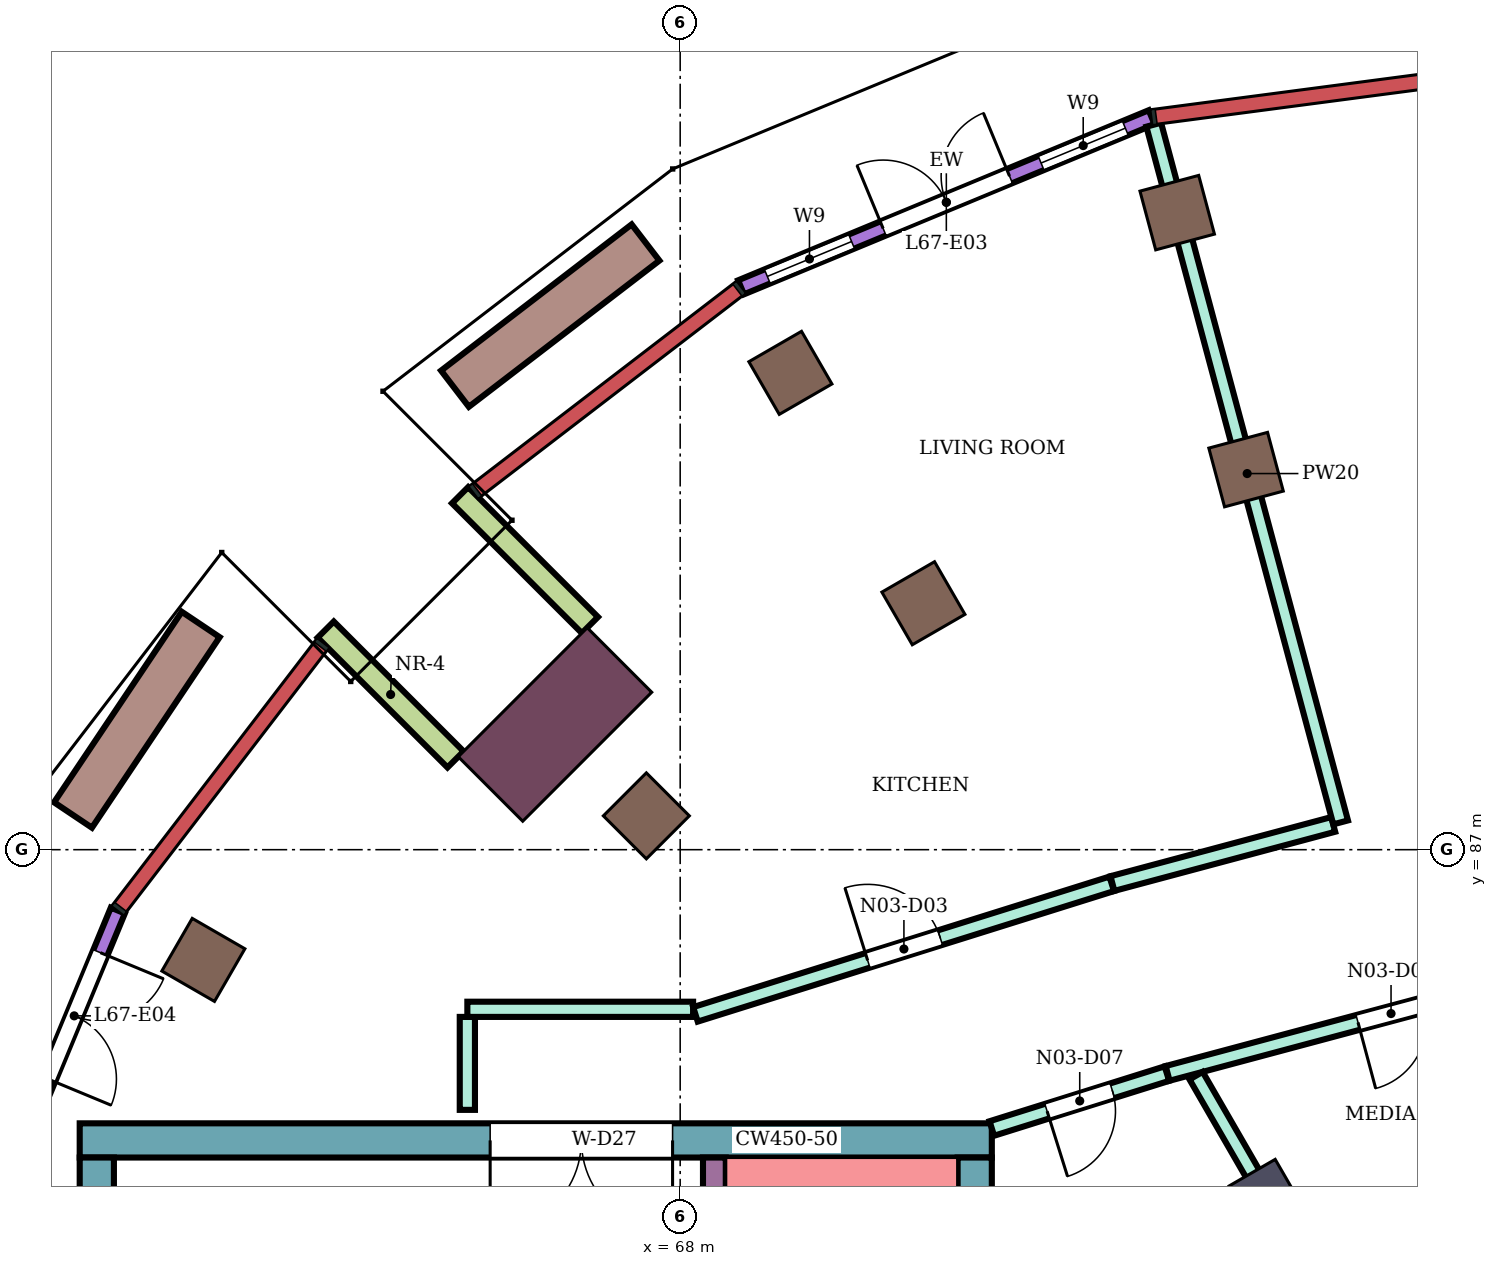
"""IFC4 building model, lengths in metres.
Left out: names, types, materials, properties, quantities, classifications, styles, units other than length and angle.
Written with IfcOpenShell. Run it as: python <this file> out.ifc"""

import sys

from ifc_helpers import new_model, si_unit, direction, frame, frame_2d, origin, origin_2d, place, context, subcontext, project, spatial, rectangle, extrude, element, fill, save


model = new_model("IFC4")
c1 = context("Model", 3, precision=1e-05, world=origin(), true_north=direction((0.0, 1.0)))
c2 = subcontext(c1, "Body", "Model", "MODEL_VIEW")
j1 = project(units=[si_unit("LENGTHUNIT", "METRE"), si_unit("PLANEANGLEUNIT", "RADIAN")], contexts=[c1])
p1 = place(None, origin())
s1 = spatial("IfcSite", under=j1, at=p1, CompositionType="ELEMENT")
p2 = place(p1, origin())
s2 = spatial("IfcBuilding", under=s1, at=p2, CompositionType="ELEMENT")
p3 = place(p2, frame((0.0, 0.0, 292.5)))
s3 = spatial("IfcBuildingStorey", under=s2, at=p3, CompositionType="ELEMENT", Elevation=292.5)
for number, where, z_axis, x_axis in (
    (1, (74.539, 95.381, 0.0), (0.0, 0.0, 1.0), (-0.259, 0.966, 0.0)),
    (2, (69.45, 93.273, 0.0), (0.0, 0.0, 1.0), (-0.5, 0.866, 0.0)),
    (3, (61.727, 85.55, 0.0), (0.0, 0.0, 1.0), (-0.866, 0.5, 0.0)),
    (4, (75.445, 92.0, 0.0), (0.0, 0.0, 1.0), (-0.259, 0.966, 0.0)),
    (5, (71.2, 90.242, 0.0), (0.0, 0.0, 1.0), (-0.5, 0.866, 0.0)),
    (6, (67.555, 87.445, 0.0), (0.0, 0.0, 1.0), (-0.707, 0.707, 0.0)),
):
    element("IfcColumn", number, at=place(p3, frame(where, z_axis=z_axis, x_axis=x_axis)), inside=s3, PredefinedType="COLUMN", context=c2, shape_type="SweptSolid", body=[
        extrude(rectangle(XDim=0.8, YDim=0.8, at=origin_2d()), origin(), (0.0, 0.0, 1.0), 4.2),
    ])
p4 = place(p3, frame((75.7, 82.448, 0.0), z_axis=(0.0, 0.0, 1.0), x_axis=(-0.5, 0.866025403784, 0.0)))
e7 = element("IfcColumn", 7, at=p4, inside=s3, PredefinedType="COLUMN", context=c2, shape_type="SweptSolid", body=[
    extrude(rectangle(XDim=0.7, YDim=0.7, at=origin_2d()), origin(), (0.0, 0.0, 1.0), 4.2),
])
p5 = place(p3, frame((66.353, 88.647, 0.0), z_axis=(0.0, 0.0, 1.0), x_axis=(-0.707106781187, 0.707106781187, 0.0)))
e8 = element("IfcColumn", 8, at=p5, inside=s3, PredefinedType="COLUMN", context=c2, shape_type="SweptSolid", body=[
    extrude(rectangle(XDim=1.2, YDim=2.4, at=origin_2d()), origin(), (0.0, 0.0, 1.0), 4.2),
])
p6 = place(p3, frame((72.1, 83.175, 0.0), z_axis=(0.0, 0.0, 1.0), x_axis=(-1.0, 0.0, 0.0)))
e9 = element("IfcWall", 9, at=p6, inside=s3, PredefinedType="SHEAR", context=c2, shape_type="SweptSolid", body=[
    extrude(rectangle(XDim=12.0, YDim=0.45, at=frame_2d((6.0, 0.0))), origin(), (0.0, 0.0, 1.0), 3.88),
])
p7 = place(p6, frame((4.2, 0.0, 0.0)))
e10 = element("IfcOpeningElement", 10, at=p7, cuts=e9, PredefinedType="OPENING", context=c2, shape_type="SweptSolid", body=[
    extrude(rectangle(XDim=2.4, YDim=2.4, at=frame_2d((1.2, 1.2))), frame((0.0, 0.235, 0.0), z_axis=(0.0, -1.0, 0.0), x_axis=(1.0, 0.0, 0.0)), (0.0, 0.0, 1.0), 0.47),
])
p8 = place(p3, frame((71.875, 82.95, 0.0), z_axis=(0.0, 0.0, 1.0), x_axis=(0.0, -1.0, 0.0)))
e11 = element("IfcWall", 11, at=p8, inside=s3, PredefinedType="SHEAR", context=c2, shape_type="SweptSolid", body=[
    extrude(rectangle(XDim=7.95, YDim=0.45, at=frame_2d((3.975, 0.0))), origin(), (0.0, 0.0, 1.0), 3.88),
])
p9 = place(p3, frame((60.325, 82.95, 0.0), z_axis=(0.0, 0.0, 1.0), x_axis=(0.0, -1.0, 0.0)))
e12 = element("IfcWall", 12, at=p9, inside=s3, PredefinedType="SHEAR", context=c2, shape_type="SweptSolid", body=[
    extrude(rectangle(XDim=3.7, YDim=0.45, at=frame_2d((1.85, 0.0))), origin(), (0.0, 0.0, 1.0), 3.88),
])
p10 = place(p3, frame((68.45, 82.95, 0.0), z_axis=(0.0, 0.0, 1.0), x_axis=(0.0, -1.0, 0.0)))
e13 = element("IfcWall", 13, at=p10, inside=s3, PredefinedType="SHEAR", context=c2, shape_type="SweptSolid", body=[
    extrude(rectangle(XDim=7.95, YDim=0.3, at=frame_2d((3.975, 0.0))), origin(), (0.0, 0.0, 1.0), 3.88),
])
p11 = place(p10, frame((0.6, 0.0, 0.0)))
e14 = element("IfcOpeningElement", 14, at=p11, cuts=e13, PredefinedType="OPENING", context=c2, shape_type="SweptSolid", body=[
    extrude(rectangle(XDim=0.9, YDim=2.1, at=frame_2d((0.45, 1.05))), frame((0.0, 0.16, 0.0), z_axis=(0.0, -1.0, 0.0), x_axis=(1.0, 0.0, 0.0)), (0.0, 0.0, 1.0), 0.32),
])
p12 = place(p3, frame((74.203, 96.636, 0.0), z_axis=(0.0, 0.0, 1.0), x_axis=(-0.923869250418, -0.382708254591, 0.0)))
e15 = element("IfcWall", 15, at=p12, inside=s3, PredefinedType="NOTDEFINED", context=c2, shape_type="SweptSolid", body=[
    extrude(rectangle(XDim=5.847, YDim=0.2, at=frame_2d((2.924, 0.0))), origin(), (0.0, 0.0, 1.0), 4.2),
])
p13 = place(p12, frame((0.375, 0.0, 0.9)))
e16 = element("IfcOpeningElement", 16, at=p13, cuts=e15, PredefinedType="OPENING", context=c2, shape_type="SweptSolid", body=[
    extrude(rectangle(XDim=1.2, YDim=2.7, at=frame_2d((0.6, 1.35))), frame((0.0, 0.11, 0.0), z_axis=(0.0, -1.0, 0.0), x_axis=(1.0, 0.0, 0.0)), (0.0, 0.0, 1.0), 0.22),
])
p14 = place(p12, frame((2.024, 0.0, 0.0)))
e17 = element("IfcOpeningElement", 17, at=p14, cuts=e15, PredefinedType="OPENING", context=c2, shape_type="SweptSolid", body=[
    extrude(rectangle(XDim=1.8, YDim=2.7, at=frame_2d((0.9, 1.35))), frame((0.0, 0.11, 0.0), z_axis=(0.0, -1.0, 0.0), x_axis=(1.0, 0.0, 0.0)), (0.0, 0.0, 1.0), 0.22),
])
p15 = place(p12, frame((4.273, 0.0, 0.9)))
e18 = element("IfcOpeningElement", 18, at=p15, cuts=e15, PredefinedType="OPENING", context=c2, shape_type="SweptSolid", body=[
    extrude(rectangle(XDim=1.2, YDim=2.7, at=frame_2d((0.6, 1.35))), frame((0.0, 0.11, 0.0), z_axis=(0.0, -1.0, 0.0), x_axis=(1.0, 0.0, 0.0)), (0.0, 0.0, 1.0), 0.22),
])
p16 = place(p3, frame((60.602, 86.199, 0.0), z_axis=(0.0, 0.0, 1.0), x_axis=(-0.382708254591, -0.923869250418, 0.0)))
e19 = element("IfcWall", 19, at=p16, inside=s3, PredefinedType="NOTDEFINED", context=c2, shape_type="SweptSolid", body=[
    extrude(rectangle(XDim=5.847, YDim=0.2, at=frame_2d((2.924, 0.0))), origin(), (0.0, 0.0, 1.0), 4.2),
])
p17 = place(p16, frame((0.6, 0.0, 0.0)))
e20 = element("IfcOpeningElement", 20, at=p17, cuts=e19, PredefinedType="OPENING", context=c2, shape_type="SweptSolid", body=[
    extrude(rectangle(XDim=1.8, YDim=2.7, at=frame_2d((0.9, 1.35))), frame((0.0, 0.11, 0.0), z_axis=(0.0, -1.0, 0.0), x_axis=(1.0, 0.0, 0.0)), (0.0, 0.0, 1.0), 0.22),
])
p18 = place(p16, frame((2.85, 0.0, 0.9)))
e21 = element("IfcOpeningElement", 21, at=p18, cuts=e19, PredefinedType="OPENING", context=c2, shape_type="SweptSolid", body=[
    extrude(rectangle(XDim=1.2, YDim=2.7, at=frame_2d((0.6, 1.35))), frame((0.0, 0.11, 0.0), z_axis=(0.0, -1.0, 0.0), x_axis=(1.0, 0.0, 0.0)), (0.0, 0.0, 1.0), 0.22),
])
for number, where, z_axis, x_axis in (
    (22, (66.812, 89.955, 0.0), (0.0, 0.0, 1.0), (-0.707, 0.707, 0.0)),
    (23, (65.045, 88.188, 0.0), (0.0, 0.0, 1.0), (-0.707, 0.707, 0.0)),
):
    element("IfcWall", number, at=place(p3, frame(where, z_axis=z_axis, x_axis=x_axis)), inside=s3, PredefinedType="NOTDEFINED", context=c2, shape_type="SweptSolid", body=[
        extrude(rectangle(XDim=2.416, YDim=0.3, at=frame_2d((1.208, 0.0))), origin(), (0.0, 0.0, 1.0), 4.2),
    ])
p19 = place(p3, frame((80.0, 82.604, 0.0), z_axis=(0.0, 0.0, 1.0), x_axis=(-0.965933654434, -0.258789828301, 0.0)))
e24 = element("IfcWall", 24, at=p19, inside=s3, PredefinedType="NOTDEFINED", context=c2, shape_type="SweptSolid", body=[
    extrude(rectangle(XDim=3.936, YDim=0.2, at=frame_2d((1.968, 0.0))), origin(), (0.0, 0.0, 1.0), 4.2),
])
p20 = place(p19, frame((0.468, 0.0, 0.9)))
e25 = element("IfcOpeningElement", 25, at=p20, cuts=e24, PredefinedType="OPENING", context=c2, shape_type="SweptSolid", body=[
    extrude(rectangle(XDim=3.0, YDim=2.3, at=frame_2d((1.5, 1.15))), frame((0.0, 0.11, 0.0), z_axis=(0.0, -1.0, 0.0), x_axis=(1.0, 0.0, 0.0)), (0.0, 0.0, 1.0), 0.22),
])
p21 = place(p3, frame((67.544, 94.988, 0.0), z_axis=(0.0, 0.0, 1.0), x_axis=(-0.793350112932, -0.608765634962, 0.0)))
e26 = element("IfcWall", 26, at=p21, inside=s3, PredefinedType="USERDEFINED", context=c2, shape_type="SweptSolid", body=[
    extrude(rectangle(XDim=3.16, YDim=0.6, at=frame_2d((1.58, 0.0))), origin(), (0.0, 0.0, 1.0), 0.6),
])
p22 = place(p3, frame((61.692, 89.963, 0.0), z_axis=(0.0, 0.0, 1.0), x_axis=(-0.556696289076, -0.830716101763, 0.0)))
e27 = element("IfcWall", 27, at=p22, inside=s3, PredefinedType="USERDEFINED", context=c2, shape_type="SweptSolid", body=[
    extrude(rectangle(XDim=3.018, YDim=0.6, at=frame_2d((1.509, 0.0))), origin(), (0.0, 0.0, 1.0), 0.6),
])
p23 = place(p3, frame((65.2, 83.577, 0.0), z_axis=(0.0, 0.0, 1.0), x_axis=(0.0, 1.0, 0.0)))
e28 = element("IfcWall", 28, at=p23, inside=s3, PredefinedType="PARTITIONING", context=c2, shape_type="SweptSolid", body=[
    extrude(rectangle(XDim=1.223, YDim=0.2, at=frame_2d((0.612, 0.0))), origin(), (0.0, 0.0, 1.0), 3.75),
])
p24 = place(p3, frame((65.2, 84.9, 0.0), z_axis=(0.0, 0.0, 1.0), x_axis=(1.0, 0.0, 0.0)))
e29 = element("IfcWall", 29, at=p24, inside=s3, PredefinedType="PARTITIONING", context=c2, shape_type="SweptSolid", body=[
    extrude(rectangle(XDim=2.97, YDim=0.2, at=frame_2d((1.485, 0.0))), origin(), (0.0, 0.0, 1.0), 3.75),
])
p25 = place(p3, frame((68.201, 84.833, 0.0), z_axis=(0.0, 0.0, 1.0), x_axis=(0.95420102455, 0.299166182492, 0.0)))
e30 = element("IfcWall", 30, at=p25, inside=s3, PredefinedType="PARTITIONING", context=c2, shape_type="SweptSolid", body=[
    extrude(rectangle(XDim=5.74, YDim=0.2, at=frame_2d((2.87, 0.0))), origin(), (0.0, 0.0, 1.0), 3.75),
])
p26 = place(p25, frame((2.374, 0.0, 0.0)))
e31 = element("IfcOpeningElement", 31, at=p26, cuts=e30, PredefinedType="OPENING", context=c2, shape_type="SweptSolid", body=[
    extrude(rectangle(XDim=1.0, YDim=2.1, at=frame_2d((0.5, 1.05))), frame((0.0, 0.11, 0.0), z_axis=(0.0, -1.0, 0.0), x_axis=(1.0, 0.0, 0.0)), (0.0, 0.0, 1.0), 0.22),
])
p27 = place(p3, frame((72.1, 83.332, 0.0), z_axis=(0.0, 0.0, 1.0), x_axis=(0.954233106619, 0.299063836383, 0.0)))
e32 = element("IfcWall", 32, at=p27, inside=s3, PredefinedType="PARTITIONING", context=c2, shape_type="SweptSolid", body=[
    extrude(rectangle(XDim=2.414, YDim=0.2, at=frame_2d((1.207, 0.0))), origin(), (0.0, 0.0, 1.0), 3.75),
])
p28 = place(p27, frame((0.762, 0.0, 0.0)))
e33 = element("IfcOpeningElement", 33, at=p28, cuts=e32, PredefinedType="OPENING", context=c2, shape_type="SweptSolid", body=[
    extrude(rectangle(XDim=0.9, YDim=2.1, at=frame_2d((0.45, 1.05))), frame((0.0, 0.11, 0.0), z_axis=(0.0, -1.0, 0.0), x_axis=(1.0, 0.0, 0.0)), (0.0, 0.0, 1.0), 0.22),
])
p29 = place(p3, frame((73.687, 86.555, 0.0), z_axis=(0.0, 0.0, 1.0), x_axis=(0.965987897826, 0.258587279759, 0.0)))
e34 = element("IfcWall", 34, at=p29, inside=s3, PredefinedType="PARTITIONING", context=c2, shape_type="SweptSolid", body=[
    extrude(rectangle(XDim=3.007, YDim=0.2, at=frame_2d((1.503, 0.0))), origin(), (0.0, 0.0, 1.0), 3.75),
])
p30 = place(p3, frame((74.23, 96.538, 0.0), z_axis=(0.0, 0.0, 1.0), x_axis=(0.258775468547, -0.965937501538, 0.0)))
e35 = element("IfcWall", 35, at=p30, inside=s3, PredefinedType="PARTITIONING", context=c2, shape_type="SweptSolid", body=[
    extrude(rectangle(XDim=9.502, YDim=0.2, at=frame_2d((4.751, 0.0))), origin(), (0.0, 0.0, 1.0), 3.75),
])
p31 = place(p3, frame((74.413, 84.057, 0.0), z_axis=(0.0, 0.0, 1.0), x_axis=(0.965972135939, 0.258646153246, 0.0)))
e36 = element("IfcWall", 36, at=p31, inside=s3, PredefinedType="PARTITIONING", context=c2, shape_type="SweptSolid", body=[
    extrude(rectangle(XDim=5.654, YDim=0.2, at=frame_2d((2.827, 0.0))), origin(), (0.0, 0.0, 1.0), 3.75),
])
p32 = place(p31, frame((2.593, 0.0, 0.0)))
e37 = element("IfcOpeningElement", 37, at=p32, cuts=e36, PredefinedType="OPENING", context=c2, shape_type="SweptSolid", body=[
    extrude(rectangle(XDim=0.9, YDim=2.1, at=frame_2d((0.45, 1.05))), frame((0.0, 0.11, 0.0), z_axis=(0.0, -1.0, 0.0), x_axis=(1.0, 0.0, 0.0)), (0.0, 0.0, 1.0), 0.22),
])
p33 = place(p3, frame((74.787, 84.027, 0.0), z_axis=(0.0, 0.0, 1.0), x_axis=(0.500079107518, -0.86597972622, 0.0)))
e38 = element("IfcWall", 38, at=p33, inside=s3, PredefinedType="PARTITIONING", context=c2, shape_type="SweptSolid", body=[
    extrude(rectangle(XDim=2.726, YDim=0.2, at=frame_2d((1.363, 0.0))), origin(), (0.0, 0.0, 1.0), 3.75),
])
p34 = place(p13, origin())
e39 = element("IfcWindow", 39, at=p34, inside=s3, PartitioningType="SINGLE_PANEL", PredefinedType="WINDOW", context=c2, shape_type="SweptSolid", body=[
    extrude(rectangle(XDim=1.2, YDim=2.7, at=frame_2d((0.6, 1.35))), frame((0.0, 0.03, 0.0), z_axis=(0.0, -1.0, 0.0), x_axis=(1.0, 0.0, 0.0)), (0.0, 0.0, 1.0), 0.06),
])
fill(e16, e39)
p35 = place(p14, frame((1.8, 0.0, 0.0), z_axis=(0.0, 0.0, 1.0), x_axis=(-1.0, 0.0, 0.0)))
e40 = element("IfcDoor", 40, at=p35, inside=s3, OperationType="DOUBLE_DOOR_SINGLE_SWING", PredefinedType="DOOR", context=c2, shape_type="SweptSolid", body=[
    extrude(rectangle(XDim=1.8, YDim=2.7, at=frame_2d((0.9, 1.35))), frame((0.0, 0.025, 0.0), z_axis=(0.0, -1.0, 0.0), x_axis=(1.0, 0.0, 0.0)), (0.0, 0.0, 1.0), 0.05),
])
fill(e17, e40)
p36 = place(p15, origin())
e41 = element("IfcWindow", 41, at=p36, inside=s3, PartitioningType="SINGLE_PANEL", PredefinedType="WINDOW", context=c2, shape_type="SweptSolid", body=[
    extrude(rectangle(XDim=1.2, YDim=2.7, at=frame_2d((0.6, 1.35))), frame((0.0, 0.03, 0.0), z_axis=(0.0, -1.0, 0.0), x_axis=(1.0, 0.0, 0.0)), (0.0, 0.0, 1.0), 0.06),
])
fill(e18, e41)
p37 = place(p17, origin())
e42 = element("IfcDoor", 42, at=p37, inside=s3, OperationType="DOUBLE_DOOR_SINGLE_SWING", PredefinedType="DOOR", context=c2, shape_type="SweptSolid", body=[
    extrude(rectangle(XDim=1.8, YDim=2.7, at=frame_2d((0.9, 1.35))), frame((0.0, 0.025, 0.0), z_axis=(0.0, -1.0, 0.0), x_axis=(1.0, 0.0, 0.0)), (0.0, 0.0, 1.0), 0.05),
])
fill(e20, e42)
p38 = place(p26, origin())
e43 = element("IfcDoor", 43, at=p38, inside=s3, OperationType="SINGLE_SWING_LEFT", PredefinedType="DOOR", context=c2, shape_type="SweptSolid", body=[
    extrude(rectangle(XDim=1.0, YDim=2.1, at=frame_2d((0.5, 1.05))), frame((0.0, 0.025, 0.0), z_axis=(0.0, -1.0, 0.0), x_axis=(1.0, 0.0, 0.0)), (0.0, 0.0, 1.0), 0.05),
])
fill(e31, e43)
p39 = place(p32, frame((0.9, 0.0, 0.0), z_axis=(0.0, 0.0, 1.0), x_axis=(-1.0, 0.0, 0.0)))
e44 = element("IfcDoor", 44, at=p39, inside=s3, OperationType="SINGLE_SWING_RIGHT", PredefinedType="DOOR", context=c2, shape_type="SweptSolid", body=[
    extrude(rectangle(XDim=0.9, YDim=2.1, at=frame_2d((0.45, 1.05))), frame((0.0, 0.025, 0.0), z_axis=(0.0, -1.0, 0.0), x_axis=(1.0, 0.0, 0.0)), (0.0, 0.0, 1.0), 0.05),
])
fill(e37, e44)
p40 = place(p28, frame((0.9, 0.0, 0.0), z_axis=(0.0, 0.0, 1.0), x_axis=(-1.0, 0.0, 0.0)))
e45 = element("IfcDoor", 45, at=p40, inside=s3, OperationType="SINGLE_SWING_RIGHT", PredefinedType="DOOR", context=c2, shape_type="SweptSolid", body=[
    extrude(rectangle(XDim=0.9, YDim=2.1, at=frame_2d((0.45, 1.05))), frame((0.0, 0.025, 0.0), z_axis=(0.0, -1.0, 0.0), x_axis=(1.0, 0.0, 0.0)), (0.0, 0.0, 1.0), 0.05),
])
fill(e33, e45)
p41 = place(p7, origin())
e46 = element("IfcDoor", 46, at=p41, inside=s3, OperationType="DOUBLE_DOOR_SINGLE_SWING", PredefinedType="DOOR", context=c2, shape_type="SweptSolid", body=[
    extrude(rectangle(XDim=2.4, YDim=2.4, at=frame_2d((1.2, 1.2))), frame((0.0, 0.025, 0.0), z_axis=(0.0, -1.0, 0.0), x_axis=(1.0, 0.0, 0.0)), (0.0, 0.0, 1.0), 0.05),
])
fill(e10, e46)
save(model, sys.argv[1])
